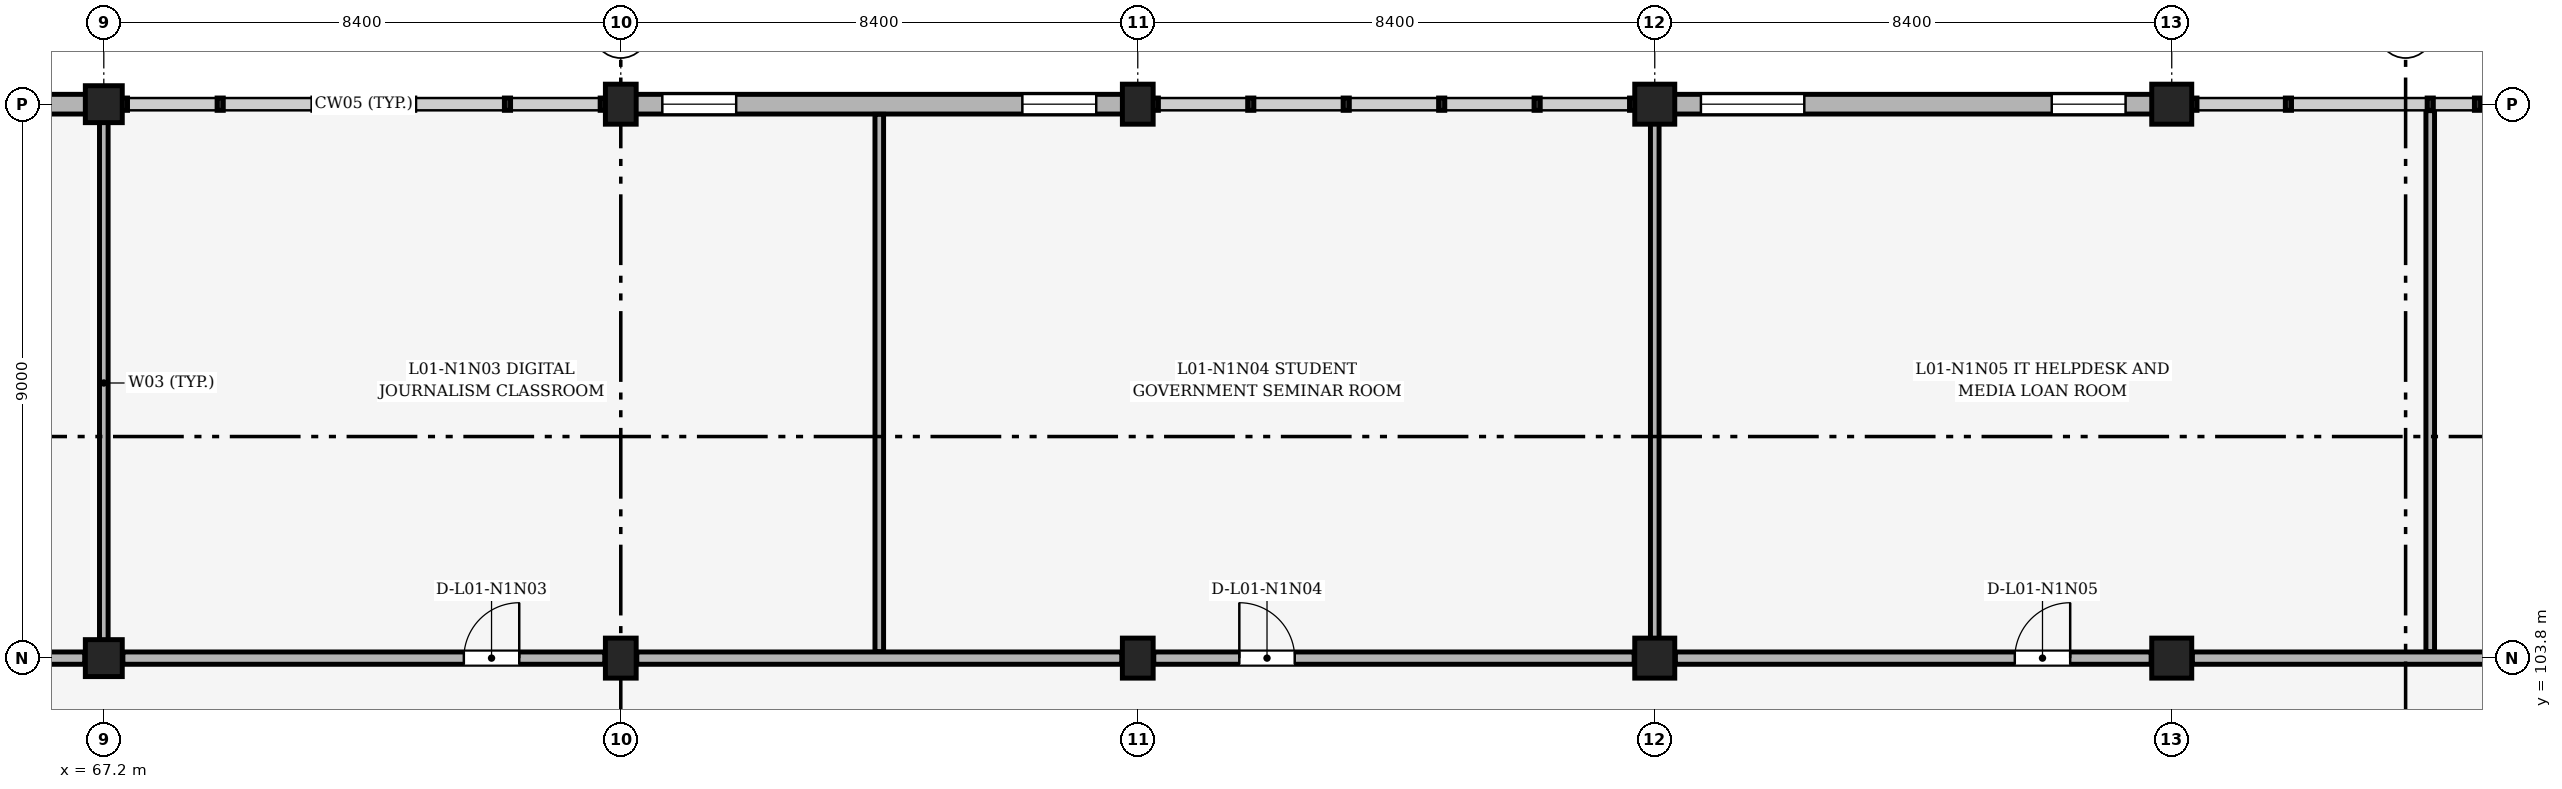
"""IFC4 building model, lengths in metres.
Left out: names, types, materials, properties, quantities, classifications, styles, units other than length and angle.
Written with IfcOpenShell. Run it as: python <this file> out.ifc"""

import sys

from ifc_helpers import new_model, si_unit, direction, frame, frame_2d, origin, origin_2d, place, context, subcontext, project, spatial, rectangle, extrude, element, fill, save


model = new_model("IFC4")
c1 = context("Model", 3, precision=1e-05, world=origin(), true_north=direction((0.0, 1.0)))
c2 = subcontext(c1, "Body", "Model", "MODEL_VIEW")
j1 = project(units=[si_unit("LENGTHUNIT", "METRE"), si_unit("PLANEANGLEUNIT", "RADIAN")], contexts=[c1])
p1 = place(None, origin())
s1 = spatial("IfcSite", under=j1, at=p1, CompositionType="ELEMENT")
p2 = place(p1, origin())
s2 = spatial("IfcBuilding", under=s1, at=p2, CompositionType="ELEMENT")
p3 = place(p2, frame((0.0, 0.0, 4.8)))
s3 = spatial("IfcBuildingStorey", under=s2, at=p3, CompositionType="ELEMENT", Elevation=4.8)
for number, where, z_axis, x_axis in (
    (1, (67.2, 103.8, 0.0), (0.0, 0.0, 1.0), (1.0, 0.0, 0.0)),
    (2, (67.2, 112.8, 0.0), (0.0, 0.0, 1.0), (1.0, 0.0, 0.0)),
):
    element("IfcColumn", number, at=place(p3, frame(where, z_axis=z_axis, x_axis=x_axis)), inside=s3, PredefinedType="COLUMN", context=c2, shape_type="SweptSolid", body=[
        extrude(rectangle(XDim=0.6, YDim=0.6, at=origin_2d()), origin(), (0.0, 0.0, 1.0), 4.2),
    ])
for number, where, z_axis, x_axis in (
    (3, (75.6, 103.8, 0.0), (0.0, 0.0, 1.0), (1.0, 0.0, 0.0)),
    (4, (75.6, 112.8, 0.0), (0.0, 0.0, 1.0), (1.0, 0.0, 0.0)),
    (5, (84.0, 103.8, 0.0), (0.0, 0.0, 1.0), (1.0, 0.0, 0.0)),
    (6, (84.0, 112.8, 0.0), (0.0, 0.0, 1.0), (1.0, 0.0, 0.0)),
):
    element("IfcColumn", number, at=place(p3, frame(where, z_axis=z_axis, x_axis=x_axis)), inside=s3, PredefinedType="COLUMN", context=c2, shape_type="SweptSolid", body=[
        extrude(rectangle(XDim=0.5, YDim=0.65, at=origin_2d()), origin(), (0.0, 0.0, 1.0), 4.2),
    ])
for number, where, z_axis, x_axis in (
    (7, (92.4, 103.8, 0.0), (0.0, 0.0, 1.0), (1.0, 0.0, 0.0)),
    (8, (92.4, 112.8, 0.0), (0.0, 0.0, 1.0), (1.0, 0.0, 0.0)),
    (9, (100.8, 103.8, 0.0), (0.0, 0.0, 1.0), (1.0, 0.0, 0.0)),
    (10, (100.8, 112.8, 0.0), (0.0, 0.0, 1.0), (1.0, 0.0, 0.0)),
):
    element("IfcColumn", number, at=place(p3, frame(where, z_axis=z_axis, x_axis=x_axis)), inside=s3, PredefinedType="COLUMN", context=c2, shape_type="SweptSolid", body=[
        extrude(rectangle(XDim=0.65, YDim=0.65, at=origin_2d()), origin(), (0.0, 0.0, 1.0), 4.2),
    ])
p4 = place(p3, frame((59.075, 112.8, 0.0), z_axis=(0.0, 0.0, 1.0), x_axis=(1.0, 0.0, 0.0)))
e11 = element("IfcWall", 11, at=p4, inside=s3, PredefinedType="SOLIDWALL", context=c2, shape_type="SweptSolid", body=[
    extrude(rectangle(XDim=7.85, YDim=0.32, at=frame_2d((3.925, 0.0))), origin(), (0.0, 0.0, 1.0), 3.32),
])
p5 = place(p4, frame((0.45, 0.0, 0.9)))
e12 = element("IfcOpeningElement", 12, at=p5, cuts=e11, PredefinedType="OPENING", context=c2, shape_type="SweptSolid", body=[
    extrude(rectangle(XDim=1.2, YDim=1.8, at=frame_2d((0.6, 0.9))), frame((0.0, 0.17, 0.0), z_axis=(0.0, -1.0, 0.0), x_axis=(1.0, 0.0, 0.0)), (0.0, 0.0, 1.0), 0.34),
])
p6 = place(p4, frame((5.57, 0.0, 0.9)))
e13 = element("IfcOpeningElement", 13, at=p6, cuts=e11, PredefinedType="OPENING", context=c2, shape_type="SweptSolid", body=[
    extrude(rectangle(XDim=1.68, YDim=2.27, at=frame_2d((0.84, 1.135))), frame((0.0, 0.17, 0.0), z_axis=(0.0, -1.0, 0.0), x_axis=(1.0, 0.0, 0.0)), (0.0, 0.0, 1.0), 0.34),
])
p7 = place(p3, frame((75.825, 112.8, 0.0), z_axis=(0.0, 0.0, 1.0), x_axis=(1.0, 0.0, 0.0)))
e14 = element("IfcWall", 14, at=p7, inside=s3, PredefinedType="SOLIDWALL", context=c2, shape_type="SweptSolid", body=[
    extrude(rectangle(XDim=7.95, YDim=0.32, at=frame_2d((3.975, 0.0))), origin(), (0.0, 0.0, 1.0), 3.22),
])
p8 = place(p7, frame((0.45, 0.0, 0.9)))
e15 = element("IfcOpeningElement", 15, at=p8, cuts=e14, PredefinedType="OPENING", context=c2, shape_type="SweptSolid", body=[
    extrude(rectangle(XDim=1.2, YDim=1.5, at=frame_2d((0.6, 0.75))), frame((0.0, 0.17, 0.0), z_axis=(0.0, -1.0, 0.0), x_axis=(1.0, 0.0, 0.0)), (0.0, 0.0, 1.0), 0.34),
])
p9 = place(p7, frame((6.3, 0.0, 0.9)))
e16 = element("IfcOpeningElement", 16, at=p9, cuts=e14, PredefinedType="OPENING", context=c2, shape_type="SweptSolid", body=[
    extrude(rectangle(XDim=1.2, YDim=1.8, at=frame_2d((0.6, 0.9))), frame((0.0, 0.17, 0.0), z_axis=(0.0, -1.0, 0.0), x_axis=(1.0, 0.0, 0.0)), (0.0, 0.0, 1.0), 0.34),
])
p10 = place(p3, frame((92.7, 112.8, 0.0), z_axis=(0.0, 0.0, 1.0), x_axis=(1.0, 0.0, 0.0)))
e17 = element("IfcWall", 17, at=p10, inside=s3, PredefinedType="SOLIDWALL", context=c2, shape_type="SweptSolid", body=[
    extrude(rectangle(XDim=7.8, YDim=0.32, at=frame_2d((3.9, 0.0))), origin(), (0.0, 0.0, 1.0), 3.12),
])
p11 = place(p10, frame((0.45, 0.0, 0.9)))
e18 = element("IfcOpeningElement", 18, at=p11, cuts=e17, PredefinedType="OPENING", context=c2, shape_type="SweptSolid", body=[
    extrude(rectangle(XDim=1.68, YDim=2.07, at=frame_2d((0.84, 1.035))), frame((0.0, 0.17, 0.0), z_axis=(0.0, -1.0, 0.0), x_axis=(1.0, 0.0, 0.0)), (0.0, 0.0, 1.0), 0.34),
])
p12 = place(p10, frame((6.15, 0.0, 0.9)))
e19 = element("IfcOpeningElement", 19, at=p12, cuts=e17, PredefinedType="OPENING", context=c2, shape_type="SweptSolid", body=[
    extrude(rectangle(XDim=1.2, YDim=1.5, at=frame_2d((0.6, 0.75))), frame((0.0, 0.17, 0.0), z_axis=(0.0, -1.0, 0.0), x_axis=(1.0, 0.0, 0.0)), (0.0, 0.0, 1.0), 0.34),
])
p13 = place(p3, frame((67.2, 103.905, 0.0), z_axis=(0.0, 0.0, 1.0), x_axis=(0.0, 1.0, 0.0)))
e20 = element("IfcWall", 20, at=p13, inside=s3, PredefinedType="PARTITIONING", context=c2, shape_type="SweptSolid", body=[
    extrude(rectangle(XDim=8.73, YDim=0.14, at=frame_2d((4.365, 0.0))), origin(), (0.0, 0.0, 1.0), 3.22),
])
p14 = place(p3, frame((79.8, 103.905, 0.0), z_axis=(0.0, 0.0, 1.0), x_axis=(0.0, 1.0, 0.0)))
e21 = element("IfcWall", 21, at=p14, inside=s3, PredefinedType="PARTITIONING", context=c2, shape_type="SweptSolid", body=[
    extrude(rectangle(XDim=8.73, YDim=0.14, at=frame_2d((4.365, 0.0))), origin(), (0.0, 0.0, 1.0), 3.9),
])
p15 = place(p3, frame((92.4, 103.905, 0.0), z_axis=(0.0, 0.0, 1.0), x_axis=(0.0, 1.0, 0.0)))
e22 = element("IfcWall", 22, at=p15, inside=s3, PredefinedType="PARTITIONING", context=c2, shape_type="SweptSolid", body=[
    extrude(rectangle(XDim=8.79, YDim=0.14, at=frame_2d((4.395, 0.0))), origin(), (0.0, 0.0, 1.0), 3.27),
])
p16 = place(p3, frame((105.0, 103.905, 0.0), z_axis=(0.0, 0.0, 1.0), x_axis=(0.0, 1.0, 0.0)))
e23 = element("IfcWall", 23, at=p16, inside=s3, PredefinedType="PARTITIONING", context=c2, shape_type="SweptSolid", body=[
    extrude(rectangle(XDim=8.79, YDim=0.14, at=frame_2d((4.395, 0.0))), origin(), (0.0, 0.0, 1.0), 3.9),
])
p17 = place(p3, frame((59.11, 103.8, 0.0), z_axis=(0.0, 0.0, 1.0), x_axis=(1.0, 0.0, 0.0)))
e24 = element("IfcWall", 24, at=p17, inside=s3, PredefinedType="PARTITIONING", context=c2, shape_type="SweptSolid", body=[
    extrude(rectangle(XDim=7.78, YDim=0.2, at=frame_2d((3.89, 0.0))), origin(), (0.0, 0.0, 1.0), 3.07),
])
p18 = place(p17, frame((1.34, 0.0, 0.0)))
e25 = element("IfcOpeningElement", 25, at=p18, cuts=e24, PredefinedType="OPENING", context=c2, shape_type="SweptSolid", body=[
    extrude(rectangle(XDim=0.9, YDim=2.1, at=frame_2d((0.45, 1.05))), frame((0.0, 0.11, 0.0), z_axis=(0.0, -1.0, 0.0), x_axis=(1.0, 0.0, 0.0)), (0.0, 0.0, 1.0), 0.22),
])
p19 = place(p3, frame((67.51, 103.8, 0.0), z_axis=(0.0, 0.0, 1.0), x_axis=(1.0, 0.0, 0.0)))
e26 = element("IfcWall", 26, at=p19, inside=s3, PredefinedType="PARTITIONING", context=c2, shape_type="SweptSolid", body=[
    extrude(rectangle(XDim=7.83, YDim=0.2, at=frame_2d((3.915, 0.0))), origin(), (0.0, 0.0, 1.0), 3.07),
])
p20 = place(p19, frame((5.54, 0.0, 0.0)))
e27 = element("IfcOpeningElement", 27, at=p20, cuts=e26, PredefinedType="OPENING", context=c2, shape_type="SweptSolid", body=[
    extrude(rectangle(XDim=0.9, YDim=2.1, at=frame_2d((0.45, 1.05))), frame((0.0, 0.11, 0.0), z_axis=(0.0, -1.0, 0.0), x_axis=(1.0, 0.0, 0.0)), (0.0, 0.0, 1.0), 0.22),
])
p21 = place(p3, frame((75.86, 103.8, 0.0), z_axis=(0.0, 0.0, 1.0), x_axis=(1.0, 0.0, 0.0)))
e28 = element("IfcWall", 28, at=p21, inside=s3, PredefinedType="PARTITIONING", context=c2, shape_type="SweptSolid", body=[
    extrude(rectangle(XDim=7.88, YDim=0.2, at=frame_2d((3.94, 0.0))), origin(), (0.0, 0.0, 1.0), 3.02),
])
p22 = place(p3, frame((84.26, 103.8, 0.0), z_axis=(0.0, 0.0, 1.0), x_axis=(1.0, 0.0, 0.0)))
e29 = element("IfcWall", 29, at=p22, inside=s3, PredefinedType="PARTITIONING", context=c2, shape_type="SweptSolid", body=[
    extrude(rectangle(XDim=7.805, YDim=0.2, at=frame_2d((3.902, 0.0))), origin(), (0.0, 0.0, 1.0), 2.97),
])
p23 = place(p22, frame((1.39, 0.0, 0.0)))
e30 = element("IfcOpeningElement", 30, at=p23, cuts=e29, PredefinedType="OPENING", context=c2, shape_type="SweptSolid", body=[
    extrude(rectangle(XDim=0.9, YDim=2.1, at=frame_2d((0.45, 1.05))), frame((0.0, 0.11, 0.0), z_axis=(0.0, -1.0, 0.0), x_axis=(1.0, 0.0, 0.0)), (0.0, 0.0, 1.0), 0.22),
])
p24 = place(p3, frame((92.735, 103.8, 0.0), z_axis=(0.0, 0.0, 1.0), x_axis=(1.0, 0.0, 0.0)))
e31 = element("IfcWall", 31, at=p24, inside=s3, PredefinedType="PARTITIONING", context=c2, shape_type="SweptSolid", body=[
    extrude(rectangle(XDim=7.73, YDim=0.2, at=frame_2d((3.865, 0.0))), origin(), (0.0, 0.0, 1.0), 3.17),
])
p25 = place(p24, frame((5.515, 0.0, 0.0)))
e32 = element("IfcOpeningElement", 32, at=p25, cuts=e31, PredefinedType="OPENING", context=c2, shape_type="SweptSolid", body=[
    extrude(rectangle(XDim=0.9, YDim=2.1, at=frame_2d((0.45, 1.05))), frame((0.0, 0.11, 0.0), z_axis=(0.0, -1.0, 0.0), x_axis=(1.0, 0.0, 0.0)), (0.0, 0.0, 1.0), 0.22),
])
p26 = place(p3, frame((101.135, 103.8, 0.0), z_axis=(0.0, 0.0, 1.0), x_axis=(1.0, 0.0, 0.0)))
e33 = element("IfcWall", 33, at=p26, inside=s3, PredefinedType="PARTITIONING", context=c2, shape_type="SweptSolid", body=[
    extrude(rectangle(XDim=7.73, YDim=0.2, at=frame_2d((3.865, 0.0))), origin(), (0.0, 0.0, 1.0), 3.12),
])
p27 = place(p8, origin())
e34 = element("IfcWindow", 34, at=p27, inside=s3, PartitioningType="SINGLE_PANEL", PredefinedType="WINDOW", context=c2, shape_type="SweptSolid", body=[
    extrude(rectangle(XDim=1.2, YDim=1.5, at=frame_2d((0.6, 0.75))), frame((0.0, 0.03, 0.0), z_axis=(0.0, -1.0, 0.0), x_axis=(1.0, 0.0, 0.0)), (0.0, 0.0, 1.0), 0.06),
])
fill(e15, e34)
p28 = place(p9, origin())
e35 = element("IfcWindow", 35, at=p28, inside=s3, PartitioningType="SINGLE_PANEL", PredefinedType="WINDOW", context=c2, shape_type="SweptSolid", body=[
    extrude(rectangle(XDim=1.2, YDim=1.8, at=frame_2d((0.6, 0.9))), frame((0.0, 0.03, 0.0), z_axis=(0.0, -1.0, 0.0), x_axis=(1.0, 0.0, 0.0)), (0.0, 0.0, 1.0), 0.06),
])
fill(e16, e35)
p29 = place(p11, origin())
e36 = element("IfcWindow", 36, at=p29, inside=s3, PartitioningType="SINGLE_PANEL", PredefinedType="WINDOW", context=c2, shape_type="SweptSolid", body=[
    extrude(rectangle(XDim=1.68, YDim=2.07, at=frame_2d((0.84, 1.035))), frame((0.0, 0.03, 0.0), z_axis=(0.0, -1.0, 0.0), x_axis=(1.0, 0.0, 0.0)), (0.0, 0.0, 1.0), 0.06),
])
fill(e18, e36)
p30 = place(p12, origin())
e37 = element("IfcWindow", 37, at=p30, inside=s3, PartitioningType="SINGLE_PANEL", PredefinedType="WINDOW", context=c2, shape_type="SweptSolid", body=[
    extrude(rectangle(XDim=1.2, YDim=1.5, at=frame_2d((0.6, 0.75))), frame((0.0, 0.03, 0.0), z_axis=(0.0, -1.0, 0.0), x_axis=(1.0, 0.0, 0.0)), (0.0, 0.0, 1.0), 0.06),
])
fill(e19, e37)
p31 = place(p20, origin())
e38 = element("IfcDoor", 38, at=p31, inside=s3, OperationType="SINGLE_SWING_RIGHT", PredefinedType="DOOR", context=c2, shape_type="SweptSolid", body=[
    extrude(rectangle(XDim=0.9, YDim=2.1, at=frame_2d((0.45, 1.05))), frame((0.0, 0.025, 0.0), z_axis=(0.0, -1.0, 0.0), x_axis=(1.0, 0.0, 0.0)), (0.0, 0.0, 1.0), 0.05),
])
fill(e27, e38)
p32 = place(p23, origin())
e39 = element("IfcDoor", 39, at=p32, inside=s3, OperationType="SINGLE_SWING_LEFT", PredefinedType="DOOR", context=c2, shape_type="SweptSolid", body=[
    extrude(rectangle(XDim=0.9, YDim=2.1, at=frame_2d((0.45, 1.05))), frame((0.0, 0.025, 0.0), z_axis=(0.0, -1.0, 0.0), x_axis=(1.0, 0.0, 0.0)), (0.0, 0.0, 1.0), 0.05),
])
fill(e30, e39)
p33 = place(p25, origin())
e40 = element("IfcDoor", 40, at=p33, inside=s3, OperationType="SINGLE_SWING_RIGHT", PredefinedType="DOOR", context=c2, shape_type="SweptSolid", body=[
    extrude(rectangle(XDim=0.9, YDim=2.1, at=frame_2d((0.45, 1.05))), frame((0.0, 0.025, 0.0), z_axis=(0.0, -1.0, 0.0), x_axis=(1.0, 0.0, 0.0)), (0.0, 0.0, 1.0), 0.05),
])
fill(e32, e40)
save(model, sys.argv[1])
